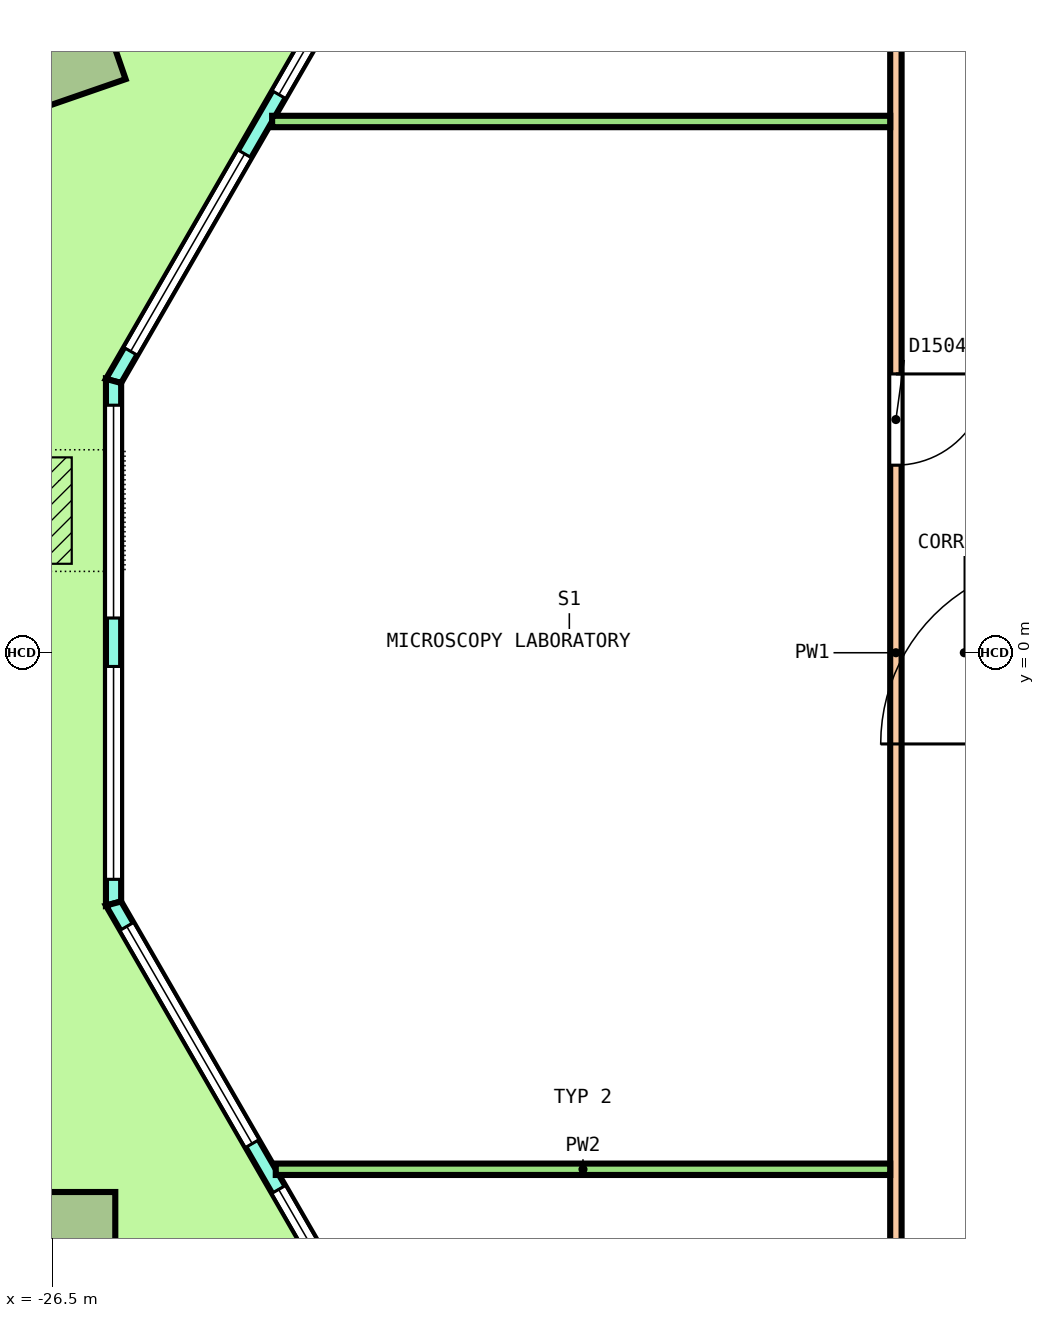
"""IFC4 building model, lengths in metres.
Left out: names, types, materials, properties, quantities, classifications, styles, units other than length and angle.
Written with IfcOpenShell. Run it as: python <this file> out.ifc"""

import sys

from ifc_helpers import new_model, si_unit, direction, frame, frame_2d, origin, origin_2d, place, context, subcontext, project, spatial, polyline, rectangle, outline, extrude, element, fill, save


model = new_model("IFC4")
c1 = context("Model", 3, precision=1e-05, world=origin(), true_north=direction((0.0, 1.0)))
c2 = subcontext(c1, "Body", "Model", "MODEL_VIEW")
j1 = project(units=[si_unit("LENGTHUNIT", "METRE"), si_unit("PLANEANGLEUNIT", "RADIAN")], contexts=[c1])
p1 = place(None, origin())
s1 = spatial("IfcSite", under=j1, at=p1, CompositionType="ELEMENT")
p2 = place(p1, origin())
s2 = spatial("IfcBuilding", under=s1, at=p2, CompositionType="ELEMENT")
p3 = place(p2, frame((0.0, 0.0, 85.2)))
s3 = spatial("IfcBuildingStorey", under=s2, at=p3, CompositionType="ELEMENT", Elevation=85.2)
p4 = place(p3, frame((-26.393, 7.963, 0.0), z_axis=(-0.021749390218, 0.025123256844, 0.9994477405), x_axis=(-0.500502362591, -0.865666942435, 0.01086875412)))
e1 = element("IfcColumn", 1, at=p4, inside=s3, PredefinedType="COLUMN", context=c2, shape_type="SweptSolid", body=[
    extrude(rectangle(XDim=1.35, YDim=1.35, at=origin_2d()), origin(), (0.0, 0.0, 1.0), 4.052),
])
p5 = place(p3, frame((-26.345, -7.77, 0.0), z_axis=(-0.010908253887, 0.018863444567, 0.99976256204), x_axis=(0.500638377412, -0.865382225109, 0.021790354016)))
e2 = element("IfcColumn", 2, at=p5, inside=s3, PredefinedType="COLUMN", context=c2, shape_type="SweptSolid", body=[
    extrude(rectangle(XDim=1.35, YDim=1.35, at=origin_2d()), origin(), (0.0, 0.0, 1.0), 4.051),
])
p6 = place(p3, frame((-15.943, 20.463, 0.0), z_axis=(0.0, 0.0, 1.0), x_axis=(-0.500002434251, -0.866023998365, 0.0)))
e3 = element("IfcWall", 3, at=p6, inside=s3, PredefinedType="SOLIDWALL", context=c2, shape_type="SweptSolid", body=[
    extrude(outline(polyline([(-0.027, -0.1), (1.002, -0.1), (2.031, -0.1), (3.061, -0.1), (4.09, -0.1), (5.119, -0.1), (6.148, -0.1), (7.177, -0.1), (8.206, -0.1), (9.235, -0.1), (10.264, -0.1), (11.293, -0.1), (12.323, -0.1), (13.352, -0.1), (14.381, -0.1), (15.41, -0.1), (16.439, -0.1), (17.468, -0.1), (18.497, -0.1), (19.526, -0.1), (19.473, 0.1), (18.449, 0.1), (17.426, 0.1), (16.402, 0.1), (15.379, 0.1), (14.355, 0.1), (13.332, 0.1), (12.308, 0.1), (11.285, 0.1), (10.261, 0.1), (9.238, 0.1), (8.215, 0.1), (7.191, 0.1), (6.168, 0.1), (5.144, 0.1), (4.121, 0.1), (3.097, 0.1), (2.074, 0.1), (1.05, 0.1), (0.027, 0.1), (-0.027, -0.1)])), origin(), (0.0, 0.0, 1.0), 4.1),
])
p7 = place(p6, frame((0.45, 0.0, 0.1)))
e4 = element("IfcOpeningElement", 4, at=p7, cuts=e3, PredefinedType="OPENING", context=c2, shape_type="SweptSolid", body=[
    extrude(rectangle(XDim=3.0, YDim=2.9, at=frame_2d((1.5, 1.45))), frame((0.0, 0.11, 0.0), z_axis=(0.0, -1.0, 0.0), x_axis=(1.0, 0.0, 0.0)), (0.0, 0.0, 1.0), 0.22),
])
p8 = place(p6, frame((4.35, 0.0, 0.1)))
e5 = element("IfcOpeningElement", 5, at=p8, cuts=e3, PredefinedType="OPENING", context=c2, shape_type="SweptSolid", body=[
    extrude(rectangle(XDim=3.0, YDim=2.9, at=frame_2d((1.5, 1.45))), frame((0.0, 0.11, 0.0), z_axis=(0.0, -1.0, 0.0), x_axis=(1.0, 0.0, 0.0)), (0.0, 0.0, 1.0), 0.22),
])
p9 = place(p6, frame((8.85, 0.0, 0.0)))
e6 = element("IfcOpeningElement", 6, at=p9, cuts=e3, PredefinedType="OPENING", context=c2, shape_type="SweptSolid", body=[
    extrude(rectangle(XDim=1.8, YDim=2.4, at=frame_2d((0.9, 1.2))), frame((0.0, 0.11, 0.0), z_axis=(0.0, -1.0, 0.0), x_axis=(1.0, 0.0, 0.0)), (0.0, 0.0, 1.0), 0.22),
])
p10 = place(p6, frame((8.85, 0.0, 2.55)))
e7 = element("IfcOpeningElement", 7, at=p10, cuts=e3, PredefinedType="OPENING", context=c2, shape_type="SweptSolid", body=[
    extrude(rectangle(XDim=1.8, YDim=0.45, at=frame_2d((0.9, 0.225))), frame((0.0, 0.11, 0.0), z_axis=(0.0, -1.0, 0.0), x_axis=(1.0, 0.0, 0.0)), (0.0, 0.0, 1.0), 0.22),
])
p11 = place(p6, frame((12.15, 0.0, 0.1)))
e8 = element("IfcOpeningElement", 8, at=p11, cuts=e3, PredefinedType="OPENING", context=c2, shape_type="SweptSolid", body=[
    extrude(rectangle(XDim=3.0, YDim=2.9, at=frame_2d((1.5, 1.45))), frame((0.0, 0.11, 0.0), z_axis=(0.0, -1.0, 0.0), x_axis=(1.0, 0.0, 0.0)), (0.0, 0.0, 1.0), 0.22),
])
p12 = place(p6, frame((16.05, 0.0, 0.1)))
e9 = element("IfcOpeningElement", 9, at=p12, cuts=e3, PredefinedType="OPENING", context=c2, shape_type="SweptSolid", body=[
    extrude(rectangle(XDim=3.0, YDim=2.9, at=frame_2d((1.5, 1.45))), frame((0.0, 0.11, 0.0), z_axis=(0.0, -1.0, 0.0), x_axis=(1.0, 0.0, 0.0)), (0.0, 0.0, 1.0), 0.22),
])
p13 = place(p3, frame((-25.693, 3.576, 0.0), z_axis=(0.0, 0.0, 1.0), x_axis=(0.0, -1.0, 0.0)))
e10 = element("IfcWall", 10, at=p13, inside=s3, PredefinedType="SOLIDWALL", context=c2, shape_type="SweptSolid", body=[
    extrude(outline(polyline([(-0.027, -0.1), (1.128, -0.1), (2.283, -0.1), (3.438, -0.1), (4.592, -0.1), (5.747, -0.1), (6.902, -0.1), (6.848, 0.1), (5.711, 0.1), (4.574, 0.1), (3.438, 0.1), (2.301, 0.1), (1.164, 0.1), (0.027, 0.1), (-0.027, -0.1)])), origin(), (0.0, 0.0, 1.0), 4.1),
])
p14 = place(p13, frame((0.319, 0.0, 0.1)))
e11 = element("IfcOpeningElement", 11, at=p14, cuts=e10, PredefinedType="OPENING", context=c2, shape_type="SweptSolid", body=[
    extrude(rectangle(XDim=2.8, YDim=2.9, at=frame_2d((1.4, 1.45))), frame((0.0, 0.11, 0.0), z_axis=(0.0, -1.0, 0.0), x_axis=(1.0, 0.0, 0.0)), (0.0, 0.0, 1.0), 0.22),
])
p15 = place(p13, frame((3.756, 0.0, 0.1)))
e12 = element("IfcOpeningElement", 12, at=p15, cuts=e10, PredefinedType="OPENING", context=c2, shape_type="SweptSolid", body=[
    extrude(rectangle(XDim=2.8, YDim=2.9, at=frame_2d((1.4, 1.45))), frame((0.0, 0.11, 0.0), z_axis=(0.0, -1.0, 0.0), x_axis=(1.0, 0.0, 0.0)), (0.0, 0.0, 1.0), 0.22),
])
p16 = place(p3, frame((-25.693, -3.299, 0.0), z_axis=(0.0, 0.0, 1.0), x_axis=(0.499997834957, -0.866026653769, 0.0)))
e13 = element("IfcWall", 13, at=p16, inside=s3, PredefinedType="SOLIDWALL", context=c2, shape_type="SweptSolid", body=[
    extrude(outline(polyline([(-0.027, -0.1), (1.028, -0.1), (2.082, -0.1), (3.136, -0.1), (4.19, -0.1), (5.245, -0.1), (6.299, -0.1), (7.354, -0.1), (8.408, -0.1), (9.462, -0.1), (10.516, -0.1), (11.571, -0.1), (12.625, -0.1), (13.679, -0.1), (14.734, -0.1), (15.788, -0.1), (16.842, -0.1), (17.897, -0.1), (18.951, -0.1), (20.005, -0.1), (19.952, 0.1), (18.903, 0.1), (17.854, 0.1), (16.806, 0.1), (15.757, 0.1), (14.708, 0.1), (13.66, 0.1), (12.611, 0.1), (11.562, 0.1), (10.514, 0.1), (9.465, 0.1), (8.416, 0.1), (7.368, 0.1), (6.319, 0.1), (5.27, 0.1), (4.221, 0.1), (3.173, 0.1), (2.124, 0.1), (1.075, 0.1), (0.027, 0.1), (-0.027, -0.1)])), origin(), (0.0, 0.0, 1.0), 4.1),
])
p17 = place(p16, frame((0.348, 0.0, 0.1)))
e14 = element("IfcOpeningElement", 14, at=p17, cuts=e13, PredefinedType="OPENING", context=c2, shape_type="SweptSolid", body=[
    extrude(rectangle(XDim=3.3, YDim=2.9, at=frame_2d((1.65, 1.45))), frame((0.0, 0.11, 0.0), z_axis=(0.0, -1.0, 0.0), x_axis=(1.0, 0.0, 0.0)), (0.0, 0.0, 1.0), 0.22),
])
p18 = place(p16, frame((4.344, 0.0, 0.1)))
e15 = element("IfcOpeningElement", 15, at=p18, cuts=e13, PredefinedType="OPENING", context=c2, shape_type="SweptSolid", body=[
    extrude(rectangle(XDim=3.3, YDim=2.9, at=frame_2d((1.65, 1.45))), frame((0.0, 0.11, 0.0), z_axis=(0.0, -1.0, 0.0), x_axis=(1.0, 0.0, 0.0)), (0.0, 0.0, 1.0), 0.22),
])
p19 = place(p16, frame((9.089, 0.0, 0.0)))
e16 = element("IfcOpeningElement", 16, at=p19, cuts=e13, PredefinedType="OPENING", context=c2, shape_type="SweptSolid", body=[
    extrude(rectangle(XDim=1.8, YDim=2.4, at=frame_2d((0.9, 1.2))), frame((0.0, 0.11, 0.0), z_axis=(0.0, -1.0, 0.0), x_axis=(1.0, 0.0, 0.0)), (0.0, 0.0, 1.0), 0.22),
])
p20 = place(p16, frame((9.089, 0.0, 2.55)))
e17 = element("IfcOpeningElement", 17, at=p20, cuts=e13, PredefinedType="OPENING", context=c2, shape_type="SweptSolid", body=[
    extrude(rectangle(XDim=1.8, YDim=0.45, at=frame_2d((0.9, 0.225))), frame((0.0, 0.11, 0.0), z_axis=(0.0, -1.0, 0.0), x_axis=(1.0, 0.0, 0.0)), (0.0, 0.0, 1.0), 0.22),
])
p21 = place(p16, frame((12.335, 0.0, 0.1)))
e18 = element("IfcOpeningElement", 18, at=p21, cuts=e13, PredefinedType="OPENING", context=c2, shape_type="SweptSolid", body=[
    extrude(rectangle(XDim=3.3, YDim=2.9, at=frame_2d((1.65, 1.45))), frame((0.0, 0.11, 0.0), z_axis=(0.0, -1.0, 0.0), x_axis=(1.0, 0.0, 0.0)), (0.0, 0.0, 1.0), 0.22),
])
p22 = place(p16, frame((16.331, 0.0, 0.1)))
e19 = element("IfcOpeningElement", 19, at=p22, cuts=e13, PredefinedType="OPENING", context=c2, shape_type="SweptSolid", body=[
    extrude(rectangle(XDim=3.3, YDim=2.9, at=frame_2d((1.65, 1.45))), frame((0.0, 0.11, 0.0), z_axis=(0.0, -1.0, 0.0), x_axis=(1.0, 0.0, 0.0)), (0.0, 0.0, 1.0), 0.22),
])
p23 = place(p3, frame((-15.4, -12.925, 0.0), z_axis=(0.0, 0.0, 1.0), x_axis=(0.0, 1.0, 0.0)))
e20 = element("IfcWall", 20, at=p23, inside=s3, PredefinedType="PARTITIONING", context=c2, shape_type="SweptSolid", body=[
    extrude(rectangle(XDim=25.85, YDim=0.15, at=frame_2d((12.925, 0.0))), origin(), (0.0, 0.0, 1.0), 3.05),
])
p24 = place(p23, frame((21.292, 0.0, 0.0)))
e21 = element("IfcOpeningElement", 21, at=p24, cuts=e20, PredefinedType="OPENING", context=c2, shape_type="SweptSolid", body=[
    extrude(rectangle(XDim=1.2, YDim=2.1, at=frame_2d((0.6, 1.05))), frame((0.0, 0.085, 0.0), z_axis=(0.0, -1.0, 0.0), x_axis=(1.0, 0.0, 0.0)), (0.0, 0.0, 1.0), 0.17),
])
p25 = place(p23, frame((15.393, 0.0, 0.0)))
e22 = element("IfcOpeningElement", 22, at=p25, cuts=e20, PredefinedType="OPENING", context=c2, shape_type="SweptSolid", body=[
    extrude(rectangle(XDim=1.2, YDim=2.1, at=frame_2d((0.6, 1.05))), frame((0.0, 0.085, 0.0), z_axis=(0.0, -1.0, 0.0), x_axis=(1.0, 0.0, 0.0)), (0.0, 0.0, 1.0), 0.17),
])
p26 = place(p23, frame((3.503, 0.0, 0.0)))
e23 = element("IfcOpeningElement", 23, at=p26, cuts=e20, PredefinedType="OPENING", context=c2, shape_type="SweptSolid", body=[
    extrude(rectangle(XDim=1.2, YDim=2.1, at=frame_2d((0.6, 1.05))), frame((0.0, 0.085, 0.0), z_axis=(0.0, -1.0, 0.0), x_axis=(1.0, 0.0, 0.0)), (0.0, 0.0, 1.0), 0.17),
])
p27 = place(p3, frame((-23.606, 6.989, 0.0), z_axis=(0.0, 0.0, 1.0), x_axis=(1.0, 0.0, 0.0)))
e24 = element("IfcWall", 24, at=p27, inside=s3, PredefinedType="PARTITIONING", context=c2, shape_type="SweptSolid", body=[
    extrude(rectangle(XDim=8.131, YDim=0.15, at=frame_2d((4.066, 0.0))), origin(), (0.0, 0.0, 1.0), 3.05),
])
p28 = place(p3, frame((-23.559, -6.795, 0.0), z_axis=(0.0, 0.0, 1.0), x_axis=(1.0, 0.0, 0.0)))
e25 = element("IfcWall", 25, at=p28, inside=s3, PredefinedType="PARTITIONING", context=c2, shape_type="SweptSolid", body=[
    extrude(rectangle(XDim=8.083, YDim=0.15, at=frame_2d((4.042, 0.0))), origin(), (0.0, 0.0, 1.0), 3.05),
])
p29 = place(p11, origin())
e26 = element("IfcWindow", 26, at=p29, inside=s3, PartitioningType="SINGLE_PANEL", PredefinedType="WINDOW", context=c2, shape_type="SweptSolid", body=[
    extrude(rectangle(XDim=3.0, YDim=2.9, at=frame_2d((1.5, 1.45))), frame((0.0, 0.03, 0.0), z_axis=(0.0, -1.0, 0.0), x_axis=(1.0, 0.0, 0.0)), (0.0, 0.0, 1.0), 0.06),
])
fill(e8, e26)
p30 = place(p12, origin())
e27 = element("IfcWindow", 27, at=p30, inside=s3, PartitioningType="SINGLE_PANEL", PredefinedType="WINDOW", context=c2, shape_type="SweptSolid", body=[
    extrude(rectangle(XDim=3.0, YDim=2.9, at=frame_2d((1.5, 1.45))), frame((0.0, 0.03, 0.0), z_axis=(0.0, -1.0, 0.0), x_axis=(1.0, 0.0, 0.0)), (0.0, 0.0, 1.0), 0.06),
])
fill(e9, e27)
p31 = place(p14, origin())
e28 = element("IfcWindow", 28, at=p31, inside=s3, PartitioningType="SINGLE_PANEL", PredefinedType="WINDOW", context=c2, shape_type="SweptSolid", body=[
    extrude(rectangle(XDim=2.8, YDim=2.9, at=frame_2d((1.4, 1.45))), frame((0.0, 0.03, 0.0), z_axis=(0.0, -1.0, 0.0), x_axis=(1.0, 0.0, 0.0)), (0.0, 0.0, 1.0), 0.06),
])
fill(e11, e28)
p32 = place(p15, origin())
e29 = element("IfcWindow", 29, at=p32, inside=s3, PartitioningType="SINGLE_PANEL", PredefinedType="WINDOW", context=c2, shape_type="SweptSolid", body=[
    extrude(rectangle(XDim=2.8, YDim=2.9, at=frame_2d((1.4, 1.45))), frame((0.0, 0.03, 0.0), z_axis=(0.0, -1.0, 0.0), x_axis=(1.0, 0.0, 0.0)), (0.0, 0.0, 1.0), 0.06),
])
fill(e12, e29)
p33 = place(p17, origin())
e30 = element("IfcWindow", 30, at=p33, inside=s3, PartitioningType="SINGLE_PANEL", PredefinedType="WINDOW", context=c2, shape_type="SweptSolid", body=[
    extrude(rectangle(XDim=3.3, YDim=2.9, at=frame_2d((1.65, 1.45))), frame((0.0, 0.03, 0.0), z_axis=(0.0, -1.0, 0.0), x_axis=(1.0, 0.0, 0.0)), (0.0, 0.0, 1.0), 0.06),
])
fill(e14, e30)
p34 = place(p18, origin())
e31 = element("IfcWindow", 31, at=p34, inside=s3, PartitioningType="SINGLE_PANEL", PredefinedType="WINDOW", context=c2, shape_type="SweptSolid", body=[
    extrude(rectangle(XDim=3.3, YDim=2.9, at=frame_2d((1.65, 1.45))), frame((0.0, 0.03, 0.0), z_axis=(0.0, -1.0, 0.0), x_axis=(1.0, 0.0, 0.0)), (0.0, 0.0, 1.0), 0.06),
])
fill(e15, e31)
p35 = place(p25, origin())
e32 = element("IfcDoor", 32, at=p35, inside=s3, OperationType="DOUBLE_DOOR_SINGLE_SWING", PredefinedType="DOOR", context=c2, shape_type="SweptSolid", body=[
    extrude(rectangle(XDim=1.2, YDim=2.1, at=frame_2d((0.6, 1.05))), frame((0.0, 0.025, 0.0), z_axis=(0.0, -1.0, 0.0), x_axis=(1.0, 0.0, 0.0)), (0.0, 0.0, 1.0), 0.05),
])
fill(e22, e32)
save(model, sys.argv[1])
